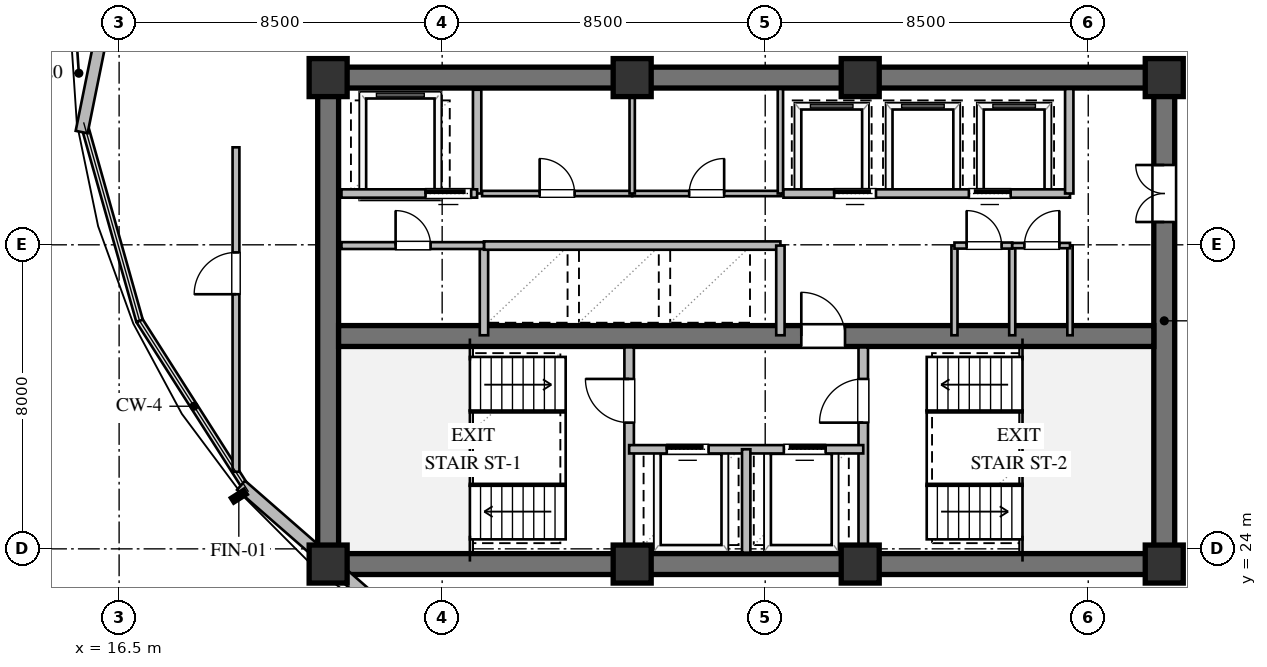
"""IFC4 building model, lengths in metres.
Left out: names, types, materials, properties, quantities, classifications, styles, units other than length and angle.
Written with IfcOpenShell. Run it as: python <this file> out.ifc"""

import sys

from ifc_helpers import new_model, si_unit, direction, frame, frame_2d, origin, origin_2d, place, context, subcontext, project, spatial, rectangle, extrude, element, fill, save


model = new_model("IFC4")
c1 = context("Model", 3, precision=1e-05, world=origin(), true_north=direction((0.0, 1.0)))
c2 = subcontext(c1, "Body", "Model", "MODEL_VIEW")
j1 = project(units=[si_unit("LENGTHUNIT", "METRE"), si_unit("PLANEANGLEUNIT", "RADIAN")], contexts=[c1])
p1 = place(None, origin())
s1 = spatial("IfcSite", under=j1, at=p1, CompositionType="ELEMENT")
p2 = place(p1, origin())
s2 = spatial("IfcBuilding", under=s1, at=p2, CompositionType="ELEMENT")
p3 = place(p2, frame((0.0, 0.0, 142.2)))
s3 = spatial("IfcBuildingStorey", under=s2, at=p3, CompositionType="ELEMENT", Elevation=142.2)
for number, where, z_axis, x_axis in (
    (1, (21.725, 23.6, 0.0), (0.0, 0.0, 1.0), (1.0, 0.0, 0.0)),
    (2, (21.725, 36.4, 0.0), (0.0, 0.0, 1.0), (1.0, 0.0, 0.0)),
):
    element("IfcWall", number, at=place(p3, frame(where, z_axis=z_axis, x_axis=x_axis)), inside=s3, PredefinedType="SHEAR", context=c2, shape_type="SweptSolid", body=[
        extrude(rectangle(XDim=22.55, YDim=0.55, at=frame_2d((11.275, 0.0))), origin(), (0.0, 0.0, 1.0), 3.36),
    ])
p4 = place(p3, frame((22.0, 23.875, 0.0), z_axis=(0.0, 0.0, 1.0), x_axis=(0.0, 1.0, 0.0)))
e3 = element("IfcWall", 3, at=p4, inside=s3, PredefinedType="SHEAR", context=c2, shape_type="SweptSolid", body=[
    extrude(rectangle(XDim=12.25, YDim=0.55, at=frame_2d((6.125, 0.0))), origin(), (0.0, 0.0, 1.0), 3.36),
])
p5 = place(p3, frame((44.0, 23.875, 0.0), z_axis=(0.0, 0.0, 1.0), x_axis=(0.0, 1.0, 0.0)))
e4 = element("IfcWall", 4, at=p5, inside=s3, PredefinedType="SHEAR", context=c2, shape_type="SweptSolid", body=[
    extrude(rectangle(XDim=12.25, YDim=0.55, at=frame_2d((6.125, 0.0))), origin(), (0.0, 0.0, 1.0), 3.36),
])
p6 = place(p5, frame((8.725, 0.0, 0.0)))
e5 = element("IfcOpeningElement", 5, at=p6, cuts=e4, PredefinedType="OPENING", context=c2, shape_type="SweptSolid", body=[
    extrude(rectangle(XDim=1.5, YDim=2.15, at=frame_2d((0.75, 1.075))), frame((0.0, 0.285, 0.0), z_axis=(0.0, -1.0, 0.0), x_axis=(1.0, 0.0, 0.0)), (0.0, 0.0, 1.0), 0.57),
])
p7 = place(p3, frame((22.275, 29.6, 0.0), z_axis=(0.0, 0.0, 1.0), x_axis=(1.0, 0.0, 0.0)))
e6 = element("IfcWall", 6, at=p7, inside=s3, PredefinedType="SHEAR", context=c2, shape_type="SweptSolid", body=[
    extrude(rectangle(XDim=21.45, YDim=0.55, at=frame_2d((10.725, 0.0))), origin(), (0.0, 0.0, 1.0), 3.36),
])
p8 = place(p7, frame((12.175, 0.0, 0.0)))
e7 = element("IfcOpeningElement", 7, at=p8, cuts=e6, PredefinedType="OPENING", context=c2, shape_type="SweptSolid", body=[
    extrude(rectangle(XDim=1.15, YDim=2.1, at=frame_2d((0.575, 1.05))), frame((0.0, 0.285, 0.0), z_axis=(0.0, -1.0, 0.0), x_axis=(1.0, 0.0, 0.0)), (0.0, 0.0, 1.0), 0.57),
])
for number, where, z_axis, x_axis in (
    (8, (22.0, 23.6, 0.0), (0.0, 0.0, 1.0), (1.0, 0.0, 0.0)),
    (9, (30.0, 23.6, 0.0), (0.0, 0.0, 1.0), (1.0, 0.0, 0.0)),
    (10, (36.0, 23.6, 0.0), (0.0, 0.0, 1.0), (1.0, 0.0, 0.0)),
    (11, (44.0, 23.6, 0.0), (0.0, 0.0, 1.0), (1.0, 0.0, 0.0)),
    (12, (44.0, 36.4, 0.0), (0.0, 0.0, 1.0), (1.0, 0.0, 0.0)),
    (13, (36.0, 36.4, 0.0), (0.0, 0.0, 1.0), (1.0, 0.0, 0.0)),
    (14, (30.0, 36.4, 0.0), (0.0, 0.0, 1.0), (1.0, 0.0, 0.0)),
    (15, (22.0, 36.4, 0.0), (0.0, 0.0, 1.0), (1.0, 0.0, 0.0)),
):
    element("IfcColumn", number, at=place(p3, frame(where, z_axis=z_axis, x_axis=x_axis)), inside=s3, PredefinedType="COLUMN", context=c2, shape_type="SweptSolid", body=[
        extrude(rectangle(XDim=1.0, YDim=1.0, at=origin_2d()), origin(), (0.0, 0.0, 1.0), 3.6),
    ])
p9 = place(p3, frame((24.225, 21.727, 0.0), z_axis=(0.0, 0.0, 1.0), x_axis=(-0.753105964003, 0.657899237713, 0.0)))
e16 = element("IfcWall", 16, at=p9, inside=s3, PredefinedType="STANDARD", context=c2, shape_type="SweptSolid", body=[
    extrude(rectangle(XDim=5.998, YDim=0.32, at=frame_2d((2.999, 0.0))), origin(), (0.0, 0.0, 1.0), 2.35),
])
p10 = place(p3, frame((15.514, 34.967, 0.0), z_axis=(0.0, 0.0, 1.0), x_axis=(0.198370893133, 0.980127026848, 0.0)))
e17 = element("IfcWall", 17, at=p10, inside=s3, PredefinedType="STANDARD", context=c2, shape_type="SweptSolid", body=[
    extrude(rectangle(XDim=14.469, YDim=0.32, at=frame_2d((7.234, 0.0))), origin(), (0.0, 0.0, 1.0), 3.36),
])
p11 = place(p3, frame((29.92, 23.9, 0.0), z_axis=(0.0, 0.0, 1.0), x_axis=(0.0, 1.0, 0.0)))
e18 = element("IfcWall", 18, at=p11, inside=s3, PredefinedType="SOLIDWALL", context=c2, shape_type="SweptSolid", body=[
    extrude(rectangle(XDim=5.4, YDim=0.25, at=frame_2d((2.7, 0.0))), origin(), (0.0, 0.0, 1.0), 2.89),
])
p12 = place(p11, frame((3.421, 0.0, 0.0)))
e19 = element("IfcOpeningElement", 19, at=p12, cuts=e18, PredefinedType="OPENING", context=c2, shape_type="SweptSolid", body=[
    extrude(rectangle(XDim=1.15, YDim=2.1, at=frame_2d((0.575, 1.05))), frame((0.0, 0.135, 0.0), z_axis=(0.0, -1.0, 0.0), x_axis=(1.0, 0.0, 0.0)), (0.0, 0.0, 1.0), 0.27),
])
p13 = place(p3, frame((36.08, 23.9, 0.0), z_axis=(0.0, 0.0, 1.0), x_axis=(0.0, 1.0, 0.0)))
e20 = element("IfcWall", 20, at=p13, inside=s3, PredefinedType="SOLIDWALL", context=c2, shape_type="SweptSolid", body=[
    extrude(rectangle(XDim=5.4, YDim=0.25, at=frame_2d((2.7, 0.0))), origin(), (0.0, 0.0, 1.0), 3.36),
])
p14 = place(p13, frame((3.421, 0.0, 0.0)))
e21 = element("IfcOpeningElement", 21, at=p14, cuts=e20, PredefinedType="OPENING", context=c2, shape_type="SweptSolid", body=[
    extrude(rectangle(XDim=1.15, YDim=2.1, at=frame_2d((0.575, 1.05))), frame((0.0, 0.135, 0.0), z_axis=(0.0, -1.0, 0.0), x_axis=(1.0, 0.0, 0.0)), (0.0, 0.0, 1.0), 0.27),
])
p15 = place(p3, frame((29.92, 26.62, 0.0), z_axis=(0.0, 0.0, 1.0), x_axis=(1.0, 0.0, 0.0)))
e22 = element("IfcWall", 22, at=p15, inside=s3, PredefinedType="SOLIDWALL", context=c2, shape_type="SweptSolid", body=[
    extrude(rectangle(XDim=6.16, YDim=0.22, at=frame_2d((3.08, 0.0))), origin(), (0.0, 0.0, 1.0), 3.36),
])
p16 = place(p15, frame((0.99, 0.0, 0.0)))
e23 = element("IfcOpeningElement", 23, at=p16, cuts=e22, PredefinedType="OPENING", context=c2, shape_type="SweptSolid", body=[
    extrude(rectangle(XDim=1.1, YDim=2.1, at=frame_2d((0.55, 1.05))), frame((0.0, 0.12, 0.0), z_axis=(0.0, -1.0, 0.0), x_axis=(1.0, 0.0, 0.0)), (0.0, 0.0, 1.0), 0.24),
])
p17 = place(p15, frame((4.07, 0.0, 0.0)))
e24 = element("IfcOpeningElement", 24, at=p17, cuts=e22, PredefinedType="OPENING", context=c2, shape_type="SweptSolid", body=[
    extrude(rectangle(XDim=1.1, YDim=2.1, at=frame_2d((0.55, 1.05))), frame((0.0, 0.12, 0.0), z_axis=(0.0, -1.0, 0.0), x_axis=(1.0, 0.0, 0.0)), (0.0, 0.0, 1.0), 0.24),
])
p18 = place(p3, frame((33.0, 23.9, 0.0), z_axis=(0.0, 0.0, 1.0), x_axis=(0.0, 1.0, 0.0)))
e25 = element("IfcWall", 25, at=p18, inside=s3, PredefinedType="SOLIDWALL", context=c2, shape_type="SweptSolid", body=[
    extrude(rectangle(XDim=2.72, YDim=0.22, at=frame_2d((1.36, 0.0))), origin(), (0.0, 0.0, 1.0), 3.36),
])
p19 = place(p3, frame((25.92, 33.35, 0.0), z_axis=(0.0, 0.0, 1.0), x_axis=(0.0, 1.0, 0.0)))
e26 = element("IfcWall", 26, at=p19, inside=s3, PredefinedType="SOLIDWALL", context=c2, shape_type="SweptSolid", body=[
    extrude(rectangle(XDim=2.73, YDim=0.22, at=frame_2d((1.365, 0.0))), origin(), (0.0, 0.0, 1.0), 3.36),
])
p20 = place(p3, frame((22.35, 33.35, 0.0), z_axis=(0.0, 0.0, 1.0), x_axis=(1.0, 0.0, 0.0)))
e27 = element("IfcWall", 27, at=p20, inside=s3, PredefinedType="SOLIDWALL", context=c2, shape_type="SweptSolid", body=[
    extrude(rectangle(XDim=3.57, YDim=0.22, at=frame_2d((1.785, 0.0))), origin(), (0.0, 0.0, 1.0), 3.36),
])
p21 = place(p20, frame((2.213, 0.0, 0.0)))
e28 = element("IfcOpeningElement", 28, at=p21, cuts=e27, PredefinedType="OPENING", context=c2, shape_type="SweptSolid", body=[
    extrude(rectangle(XDim=1.2, YDim=2.1, at=frame_2d((0.6, 1.05))), frame((0.0, 0.12, 0.0), z_axis=(0.0, -1.0, 0.0), x_axis=(1.0, 0.0, 0.0)), (0.0, 0.0, 1.0), 0.24),
])
p22 = place(p3, frame((26.1, 29.62, 0.0), z_axis=(0.0, 0.0, 1.0), x_axis=(0.0, 1.0, 0.0)))
e29 = element("IfcWall", 29, at=p22, inside=s3, PredefinedType="SOLIDWALL", context=c2, shape_type="SweptSolid", body=[
    extrude(rectangle(XDim=2.36, YDim=0.22, at=frame_2d((1.18, 0.0))), origin(), (0.0, 0.0, 1.0), 3.36),
])
p23 = place(p3, frame((26.1, 31.98, 0.0), z_axis=(0.0, 0.0, 1.0), x_axis=(1.0, 0.0, 0.0)))
e30 = element("IfcWall", 30, at=p23, inside=s3, PredefinedType="SOLIDWALL", context=c2, shape_type="SweptSolid", body=[
    extrude(rectangle(XDim=7.8, YDim=0.22, at=frame_2d((3.9, 0.0))), origin(), (0.0, 0.0, 1.0), 3.36),
])
p24 = place(p3, frame((33.9, 29.62, 0.0), z_axis=(0.0, 0.0, 1.0), x_axis=(0.0, 1.0, 0.0)))
e31 = element("IfcWall", 31, at=p24, inside=s3, PredefinedType="SOLIDWALL", context=c2, shape_type="SweptSolid", body=[
    extrude(rectangle(XDim=2.36, YDim=0.22, at=frame_2d((1.18, 0.0))), origin(), (0.0, 0.0, 1.0), 3.36),
])
p25 = place(p3, frame((26.05, 33.35, 0.0), z_axis=(0.0, 0.0, 1.0), x_axis=(1.0, 0.0, 0.0)))
e32 = element("IfcWall", 32, at=p25, inside=s3, PredefinedType="PARTITIONING", context=c2, shape_type="SweptSolid", body=[
    extrude(rectangle(XDim=3.95, YDim=0.14, at=frame_2d((1.975, 0.0))), origin(), (0.0, 0.0, 1.0), 3.36),
])
p26 = place(p25, frame((1.515, 0.0, 0.0)))
e33 = element("IfcOpeningElement", 33, at=p26, cuts=e32, PredefinedType="OPENING", context=c2, shape_type="SweptSolid", body=[
    extrude(rectangle(XDim=0.92, YDim=2.1, at=frame_2d((0.46, 1.05))), frame((0.0, 0.08, 0.0), z_axis=(0.0, -1.0, 0.0), x_axis=(1.0, 0.0, 0.0)), (0.0, 0.0, 1.0), 0.16),
])
p27 = place(p3, frame((30.0, 33.35, 0.0), z_axis=(0.0, 0.0, 1.0), x_axis=(1.0, 0.0, 0.0)))
e34 = element("IfcWall", 34, at=p27, inside=s3, PredefinedType="PARTITIONING", context=c2, shape_type="SweptSolid", body=[
    extrude(rectangle(XDim=3.92, YDim=0.14, at=frame_2d((1.96, 0.0))), origin(), (0.0, 0.0, 1.0), 3.36),
])
p28 = place(p27, frame((1.5, 0.0, 0.0)))
e35 = element("IfcOpeningElement", 35, at=p28, cuts=e34, PredefinedType="OPENING", context=c2, shape_type="SweptSolid", body=[
    extrude(rectangle(XDim=0.92, YDim=2.1, at=frame_2d((0.46, 1.05))), frame((0.0, 0.08, 0.0), z_axis=(0.0, -1.0, 0.0), x_axis=(1.0, 0.0, 0.0)), (0.0, 0.0, 1.0), 0.16),
])
for number, where, z_axis, x_axis in (
    (36, (30.0, 33.35, 0.0), (0.0, 0.0, 1.0), (0.0, 1.0, 0.0)),
    (37, (33.9, 33.35, 0.0), (0.0, 0.0, 1.0), (0.0, 1.0, 0.0)),
):
    element("IfcWall", number, at=place(p3, frame(where, z_axis=z_axis, x_axis=x_axis)), inside=s3, PredefinedType="PARTITIONING", context=c2, shape_type="SweptSolid", body=[
        extrude(rectangle(XDim=2.75, YDim=0.14, at=frame_2d((1.375, 0.0))), origin(), (0.0, 0.0, 1.0), 3.36),
    ])
p29 = place(p3, frame((33.98, 33.35, 0.0), z_axis=(0.0, 0.0, 1.0), x_axis=(1.0, 0.0, 0.0)))
e38 = element("IfcWall", 38, at=p29, inside=s3, PredefinedType="SOLIDWALL", context=c2, shape_type="SweptSolid", body=[
    extrude(rectangle(XDim=7.54, YDim=0.22, at=frame_2d((3.77, 0.0))), origin(), (0.0, 0.0, 1.0), 3.36),
])
p30 = place(p29, frame((1.335, 0.0, 0.0)))
e39 = element("IfcOpeningElement", 39, at=p30, cuts=e38, PredefinedType="OPENING", context=c2, shape_type="SweptSolid", body=[
    extrude(rectangle(XDim=1.1, YDim=2.1, at=frame_2d((0.55, 1.05))), frame((0.0, 0.12, 0.0), z_axis=(0.0, -1.0, 0.0), x_axis=(1.0, 0.0, 0.0)), (0.0, 0.0, 1.0), 0.24),
])
p31 = place(p29, frame((4.879, 0.0, 0.0)))
e40 = element("IfcOpeningElement", 40, at=p31, cuts=e38, PredefinedType="OPENING", context=c2, shape_type="SweptSolid", body=[
    extrude(rectangle(XDim=1.1, YDim=2.1, at=frame_2d((0.55, 1.05))), frame((0.0, 0.12, 0.0), z_axis=(0.0, -1.0, 0.0), x_axis=(1.0, 0.0, 0.0)), (0.0, 0.0, 1.0), 0.24),
])
p32 = place(p3, frame((41.5, 33.35, 0.0), z_axis=(0.0, 0.0, 1.0), x_axis=(0.0, 1.0, 0.0)))
e41 = element("IfcWall", 41, at=p32, inside=s3, PredefinedType="SOLIDWALL", context=c2, shape_type="SweptSolid", body=[
    extrude(rectangle(XDim=2.75, YDim=0.22, at=frame_2d((1.375, 0.0))), origin(), (0.0, 0.0, 1.0), 3.36),
])
p33 = place(p3, frame((22.35, 31.98, 0.0), z_axis=(0.0, 0.0, 1.0), x_axis=(1.0, 0.0, 0.0)))
e42 = element("IfcWall", 42, at=p33, inside=s3, PredefinedType="PARTITIONING", context=c2, shape_type="SweptSolid", body=[
    extrude(rectangle(XDim=3.75, YDim=0.18, at=frame_2d((1.875, 0.0))), origin(), (0.0, 0.0, 1.0), 3.36),
])
p34 = place(p33, frame((1.425, 0.0, 0.0)))
e43 = element("IfcOpeningElement", 43, at=p34, cuts=e42, PredefinedType="OPENING", context=c2, shape_type="SweptSolid", body=[
    extrude(rectangle(XDim=0.92, YDim=2.1, at=frame_2d((0.46, 1.05))), frame((0.0, 0.1, 0.0), z_axis=(0.0, -1.0, 0.0), x_axis=(1.0, 0.0, 0.0)), (0.0, 0.0, 1.0), 0.2),
])
for number, where, z_axis, x_axis in (
    (44, (38.48, 29.62, 0.0), (0.0, 0.0, 1.0), (0.0, 1.0, 0.0)),
    (45, (40.0, 29.62, 0.0), (0.0, 0.0, 1.0), (0.0, 1.0, 0.0)),
):
    element("IfcWall", number, at=place(p3, frame(where, z_axis=z_axis, x_axis=x_axis)), inside=s3, PredefinedType="PLUMBINGWALL", context=c2, shape_type="SweptSolid", body=[
        extrude(rectangle(XDim=2.36, YDim=0.16, at=frame_2d((1.18, 0.0))), origin(), (0.0, 0.0, 1.0), 3.36),
    ])
p35 = place(p3, frame((41.52, 29.62, 0.0), z_axis=(0.0, 0.0, 1.0), x_axis=(0.0, 1.0, 0.0)))
e46 = element("IfcWall", 46, at=p35, inside=s3, PredefinedType="PARTITIONING", context=c2, shape_type="SweptSolid", body=[
    extrude(rectangle(XDim=2.36, YDim=0.14, at=frame_2d((1.18, 0.0))), origin(), (0.0, 0.0, 1.0), 3.36),
])
p36 = place(p3, frame((38.48, 31.98, 0.0), z_axis=(0.0, 0.0, 1.0), x_axis=(1.0, 0.0, 0.0)))
e47 = element("IfcWall", 47, at=p36, inside=s3, PredefinedType="PLUMBINGWALL", context=c2, shape_type="SweptSolid", body=[
    extrude(rectangle(XDim=1.52, YDim=0.16, at=frame_2d((0.76, 0.0))), origin(), (0.0, 0.0, 1.0), 3.36),
])
p37 = place(p36, frame((0.32, 0.0, 0.0)))
e48 = element("IfcOpeningElement", 48, at=p37, cuts=e47, PredefinedType="OPENING", context=c2, shape_type="SweptSolid", body=[
    extrude(rectangle(XDim=0.92, YDim=2.1, at=frame_2d((0.46, 1.05))), frame((0.0, 0.09, 0.0), z_axis=(0.0, -1.0, 0.0), x_axis=(1.0, 0.0, 0.0)), (0.0, 0.0, 1.0), 0.18),
])
p38 = place(p3, frame((40.0, 31.98, 0.0), z_axis=(0.0, 0.0, 1.0), x_axis=(1.0, 0.0, 0.0)))
e49 = element("IfcWall", 49, at=p38, inside=s3, PredefinedType="PARTITIONING", context=c2, shape_type="SweptSolid", body=[
    extrude(rectangle(XDim=1.52, YDim=0.14, at=frame_2d((0.76, 0.0))), origin(), (0.0, 0.0, 1.0), 3.36),
])
p39 = place(p38, frame((0.32, 0.0, 0.0)))
e50 = element("IfcOpeningElement", 50, at=p39, cuts=e49, PredefinedType="OPENING", context=c2, shape_type="SweptSolid", body=[
    extrude(rectangle(XDim=0.92, YDim=2.1, at=frame_2d((0.46, 1.05))), frame((0.0, 0.08, 0.0), z_axis=(0.0, -1.0, 0.0), x_axis=(1.0, 0.0, 0.0)), (0.0, 0.0, 1.0), 0.16),
])
p40 = place(p3, frame((19.575, 26.029, 0.0), z_axis=(0.0, 0.0, 1.0), x_axis=(0.0, 1.0, 0.0)))
e51 = element("IfcWall", 51, at=p40, inside=s3, PredefinedType="PARTITIONING", context=c2, shape_type="SweptSolid", body=[
    extrude(rectangle(XDim=8.536, YDim=0.18, at=frame_2d((4.268, 0.0))), origin(), (0.0, 0.0, 1.0), 2.657),
])
p41 = place(p40, frame((4.671, 0.0, 0.0)))
e52 = element("IfcOpeningElement", 52, at=p41, cuts=e51, PredefinedType="OPENING", context=c2, shape_type="SweptSolid", body=[
    extrude(rectangle(XDim=1.1, YDim=2.1, at=frame_2d((0.55, 1.05))), frame((0.0, 0.1, 0.0), z_axis=(0.0, -1.0, 0.0), x_axis=(1.0, 0.0, 0.0)), (0.0, 0.0, 1.0), 0.2),
])
p42 = place(p12, origin())
e53 = element("IfcDoor", 53, at=p42, inside=s3, OperationType="SINGLE_SWING_RIGHT", PredefinedType="DOOR", context=c2, shape_type="SweptSolid", body=[
    extrude(rectangle(XDim=1.15, YDim=2.1, at=frame_2d((0.575, 1.05))), frame((0.0, 0.025, 0.0), z_axis=(0.0, -1.0, 0.0), x_axis=(1.0, 0.0, 0.0)), (0.0, 0.0, 1.0), 0.05),
])
fill(e19, e53)
p43 = place(p14, origin())
e54 = element("IfcDoor", 54, at=p43, inside=s3, OperationType="SINGLE_SWING_LEFT", PredefinedType="DOOR", context=c2, shape_type="SweptSolid", body=[
    extrude(rectangle(XDim=1.15, YDim=2.1, at=frame_2d((0.575, 1.05))), frame((0.0, 0.025, 0.0), z_axis=(0.0, -1.0, 0.0), x_axis=(1.0, 0.0, 0.0)), (0.0, 0.0, 1.0), 0.05),
])
fill(e21, e54)
p44 = place(p16, origin())
e55 = element("IfcDoor", 55, at=p44, inside=s3, OperationType="SLIDING_TO_LEFT", PredefinedType="DOOR", context=c2, shape_type="SweptSolid", body=[
    extrude(rectangle(XDim=1.1, YDim=2.1, at=frame_2d((0.55, 1.05))), frame((0.0, 0.025, 0.0), z_axis=(0.0, -1.0, 0.0), x_axis=(1.0, 0.0, 0.0)), (0.0, 0.0, 1.0), 0.05),
])
fill(e23, e55)
p45 = place(p17, origin())
e56 = element("IfcDoor", 56, at=p45, inside=s3, OperationType="SLIDING_TO_RIGHT", PredefinedType="DOOR", context=c2, shape_type="SweptSolid", body=[
    extrude(rectangle(XDim=1.1, YDim=2.1, at=frame_2d((0.55, 1.05))), frame((0.0, 0.025, 0.0), z_axis=(0.0, -1.0, 0.0), x_axis=(1.0, 0.0, 0.0)), (0.0, 0.0, 1.0), 0.05),
])
fill(e24, e56)
p46 = place(p8, origin())
e57 = element("IfcDoor", 57, at=p46, inside=s3, OperationType="SINGLE_SWING_LEFT", PredefinedType="DOOR", context=c2, shape_type="SweptSolid", body=[
    extrude(rectangle(XDim=1.15, YDim=2.1, at=frame_2d((0.575, 1.05))), frame((0.0, 0.025, 0.0), z_axis=(0.0, -1.0, 0.0), x_axis=(1.0, 0.0, 0.0)), (0.0, 0.0, 1.0), 0.05),
])
fill(e7, e57)
p47 = place(p6, origin())
e58 = element("IfcDoor", 58, at=p47, inside=s3, OperationType="DOUBLE_DOOR_SINGLE_SWING", PredefinedType="DOOR", context=c2, shape_type="SweptSolid", body=[
    extrude(rectangle(XDim=1.5, YDim=2.15, at=frame_2d((0.75, 1.075))), frame((0.0, 0.025, 0.0), z_axis=(0.0, -1.0, 0.0), x_axis=(1.0, 0.0, 0.0)), (0.0, 0.0, 1.0), 0.05),
])
fill(e5, e58)
p48 = place(p21, origin())
e59 = element("IfcDoor", 59, at=p48, inside=s3, OperationType="SLIDING_TO_LEFT", PredefinedType="DOOR", context=c2, shape_type="SweptSolid", body=[
    extrude(rectangle(XDim=1.2, YDim=2.1, at=frame_2d((0.6, 1.05))), frame((0.0, 0.025, 0.0), z_axis=(0.0, -1.0, 0.0), x_axis=(1.0, 0.0, 0.0)), (0.0, 0.0, 1.0), 0.05),
])
fill(e28, e59)
p49 = place(p26, origin())
e60 = element("IfcDoor", 60, at=p49, inside=s3, OperationType="SINGLE_SWING_LEFT", PredefinedType="DOOR", context=c2, shape_type="SweptSolid", body=[
    extrude(rectangle(XDim=0.92, YDim=2.1, at=frame_2d((0.46, 1.05))), frame((0.0, 0.025, 0.0), z_axis=(0.0, -1.0, 0.0), x_axis=(1.0, 0.0, 0.0)), (0.0, 0.0, 1.0), 0.05),
])
fill(e33, e60)
p50 = place(p28, origin())
e61 = element("IfcDoor", 61, at=p50, inside=s3, OperationType="SINGLE_SWING_RIGHT", PredefinedType="DOOR", context=c2, shape_type="SweptSolid", body=[
    extrude(rectangle(XDim=0.92, YDim=2.1, at=frame_2d((0.46, 1.05))), frame((0.0, 0.025, 0.0), z_axis=(0.0, -1.0, 0.0), x_axis=(1.0, 0.0, 0.0)), (0.0, 0.0, 1.0), 0.05),
])
fill(e35, e61)
p51 = place(p30, origin())
e62 = element("IfcDoor", 62, at=p51, inside=s3, OperationType="SLIDING_TO_LEFT", PredefinedType="DOOR", context=c2, shape_type="SweptSolid", body=[
    extrude(rectangle(XDim=1.1, YDim=2.1, at=frame_2d((0.55, 1.05))), frame((0.0, 0.025, 0.0), z_axis=(0.0, -1.0, 0.0), x_axis=(1.0, 0.0, 0.0)), (0.0, 0.0, 1.0), 0.05),
])
fill(e39, e62)
p52 = place(p31, origin())
e63 = element("IfcDoor", 63, at=p52, inside=s3, OperationType="SLIDING_TO_RIGHT", PredefinedType="DOOR", context=c2, shape_type="SweptSolid", body=[
    extrude(rectangle(XDim=1.1, YDim=2.1, at=frame_2d((0.55, 1.05))), frame((0.0, 0.025, 0.0), z_axis=(0.0, -1.0, 0.0), x_axis=(1.0, 0.0, 0.0)), (0.0, 0.0, 1.0), 0.05),
])
fill(e40, e63)
p53 = place(p34, origin())
e64 = element("IfcDoor", 64, at=p53, inside=s3, OperationType="SINGLE_SWING_LEFT", PredefinedType="DOOR", context=c2, shape_type="SweptSolid", body=[
    extrude(rectangle(XDim=0.92, YDim=2.1, at=frame_2d((0.46, 1.05))), frame((0.0, 0.025, 0.0), z_axis=(0.0, -1.0, 0.0), x_axis=(1.0, 0.0, 0.0)), (0.0, 0.0, 1.0), 0.05),
])
fill(e43, e64)
p54 = place(p37, origin())
e65 = element("IfcDoor", 65, at=p54, inside=s3, OperationType="SINGLE_SWING_LEFT", PredefinedType="DOOR", context=c2, shape_type="SweptSolid", body=[
    extrude(rectangle(XDim=0.92, YDim=2.1, at=frame_2d((0.46, 1.05))), frame((0.0, 0.025, 0.0), z_axis=(0.0, -1.0, 0.0), x_axis=(1.0, 0.0, 0.0)), (0.0, 0.0, 1.0), 0.05),
])
fill(e48, e65)
p55 = place(p39, origin())
e66 = element("IfcDoor", 66, at=p55, inside=s3, OperationType="SINGLE_SWING_RIGHT", PredefinedType="DOOR", context=c2, shape_type="SweptSolid", body=[
    extrude(rectangle(XDim=0.92, YDim=2.1, at=frame_2d((0.46, 1.05))), frame((0.0, 0.025, 0.0), z_axis=(0.0, -1.0, 0.0), x_axis=(1.0, 0.0, 0.0)), (0.0, 0.0, 1.0), 0.05),
])
fill(e50, e66)
p56 = place(p41, origin())
e67 = element("IfcDoor", 67, at=p56, inside=s3, OperationType="SINGLE_SWING_LEFT", PredefinedType="DOOR", context=c2, shape_type="SweptSolid", body=[
    extrude(rectangle(XDim=1.1, YDim=2.1, at=frame_2d((0.55, 1.05))), frame((0.0, 0.025, 0.0), z_axis=(0.0, -1.0, 0.0), x_axis=(1.0, 0.0, 0.0)), (0.0, 0.0, 1.0), 0.05),
])
fill(e52, e67)
save(model, sys.argv[1])
